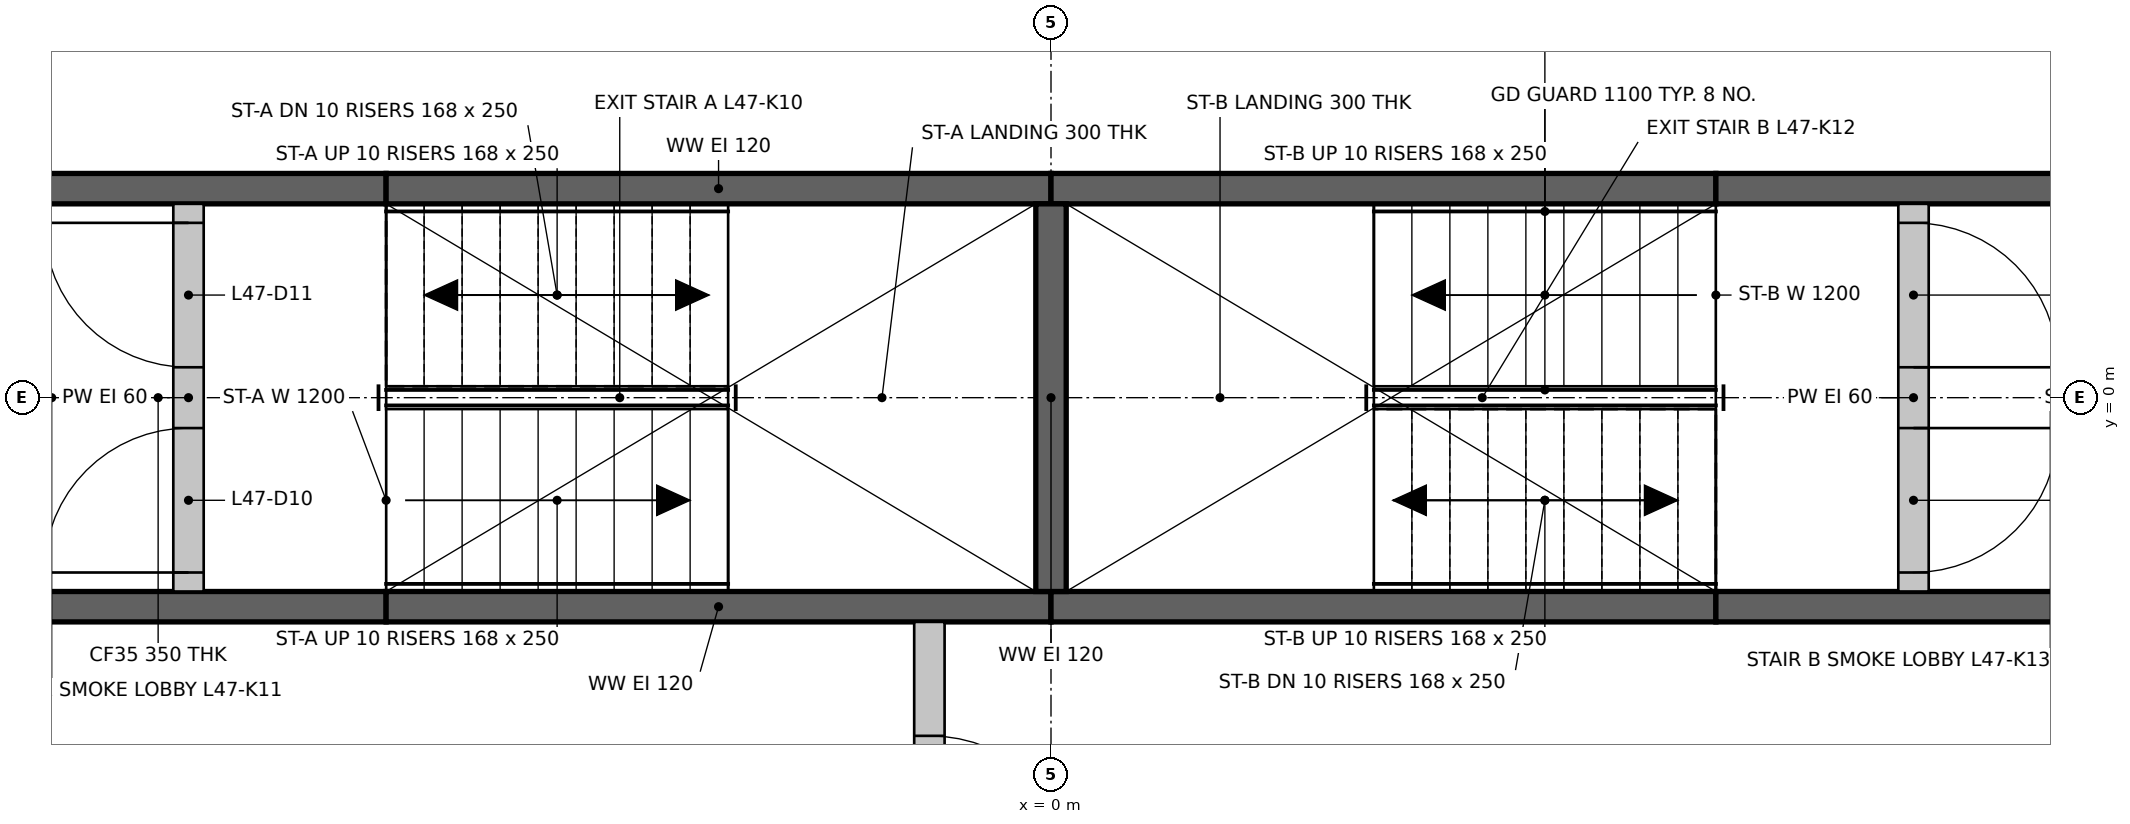
"""IFC4 building model, lengths in metres.
Left out: names, types, materials, properties, quantities, classifications, styles, units other than length and angle.
Written with IfcOpenShell. Run it as: python <this file> out.ifc"""

import sys

from ifc_helpers import new_model, si_unit, direction, frame, frame_2d, origin, place, context, subcontext, project, spatial, rectangle, extrude, element, fill, save


model = new_model("IFC4")
c1 = context("Model", 3, precision=1e-05, world=origin(), true_north=direction((0.0, 1.0)))
c2 = subcontext(c1, "Body", "Model", "MODEL_VIEW")
j1 = project(units=[si_unit("LENGTHUNIT", "METRE"), si_unit("PLANEANGLEUNIT", "RADIAN")], contexts=[c1])
p1 = place(None, origin())
s1 = spatial("IfcSite", under=j1, at=p1, CompositionType="ELEMENT")
p2 = place(p1, origin())
s2 = spatial("IfcBuilding", under=s1, at=p2, CompositionType="ELEMENT")
p3 = place(p2, frame((0.0, 0.0, 180.95)))
s3 = spatial("IfcBuildingStorey", under=s2, at=p3, CompositionType="ELEMENT", Elevation=180.95)
p4 = place(p3, frame((-7.374, -1.375, 0.0), z_axis=(0.0, 0.0, 1.0), x_axis=(1.0, 0.0, 0.0)))
e1 = element("IfcWall", 1, at=p4, inside=s3, PredefinedType="SHEAR", context=c2, shape_type="SweptSolid", body=[
    extrude(rectangle(XDim=3.0, YDim=0.2, at=frame_2d((1.5, 0.0))), origin(), (0.0, 0.0, 1.0), 3.0),
])
for number, where, z_axis, x_axis in (
    (2, (-4.374, -1.375, 0.0), (0.0, 0.0, 1.0), (1.0, 0.0, 0.0)),
    (3, (0.0, -1.375, 0.0), (0.0, 0.0, 1.0), (1.0, 0.0, 0.0)),
):
    element("IfcWall", number, at=place(p3, frame(where, z_axis=z_axis, x_axis=x_axis)), inside=s3, PredefinedType="SHEAR", context=c2, shape_type="SweptSolid", body=[
        extrude(rectangle(XDim=4.374, YDim=0.2, at=frame_2d((2.187, 0.0))), origin(), (0.0, 0.0, 1.0), 3.0),
    ])
for number, where, z_axis, x_axis in (
    (4, (4.374, -1.375, 0.0), (0.0, 0.0, 1.0), (1.0, 0.0, 0.0)),
    (5, (-7.374, 1.375, 0.0), (0.0, 0.0, 1.0), (1.0, 0.0, 0.0)),
):
    element("IfcWall", number, at=place(p3, frame(where, z_axis=z_axis, x_axis=x_axis)), inside=s3, PredefinedType="SHEAR", context=c2, shape_type="SweptSolid", body=[
        extrude(rectangle(XDim=3.0, YDim=0.2, at=frame_2d((1.5, 0.0))), origin(), (0.0, 0.0, 1.0), 3.0),
    ])
for number, where, z_axis, x_axis in (
    (6, (-4.374, 1.375, 0.0), (0.0, 0.0, 1.0), (1.0, 0.0, 0.0)),
    (7, (0.0, 1.375, 0.0), (0.0, 0.0, 1.0), (1.0, 0.0, 0.0)),
):
    element("IfcWall", number, at=place(p3, frame(where, z_axis=z_axis, x_axis=x_axis)), inside=s3, PredefinedType="SHEAR", context=c2, shape_type="SweptSolid", body=[
        extrude(rectangle(XDim=4.374, YDim=0.2, at=frame_2d((2.187, 0.0))), origin(), (0.0, 0.0, 1.0), 3.0),
    ])
p5 = place(p3, frame((4.374, 1.375, 0.0), z_axis=(0.0, 0.0, 1.0), x_axis=(1.0, 0.0, 0.0)))
e8 = element("IfcWall", 8, at=p5, inside=s3, PredefinedType="SHEAR", context=c2, shape_type="SweptSolid", body=[
    extrude(rectangle(XDim=3.0, YDim=0.2, at=frame_2d((1.5, 0.0))), origin(), (0.0, 0.0, 1.0), 3.0),
])
p6 = place(p3, frame((0.0, -1.275, 0.0), z_axis=(0.0, 0.0, 1.0), x_axis=(0.0, 1.0, 0.0)))
e9 = element("IfcWall", 9, at=p6, inside=s3, PredefinedType="SHEAR", context=c2, shape_type="SweptSolid", body=[
    extrude(rectangle(XDim=2.55, YDim=0.2, at=frame_2d((1.275, 0.0))), origin(), (0.0, 0.0, 1.0), 3.0),
])
p7 = place(p3, frame((-0.8, -3.974, 0.0), z_axis=(0.0, 0.0, 1.0), x_axis=(0.0, 1.0, 0.0)))
e10 = element("IfcWall", 10, at=p7, inside=s3, PredefinedType="PARTITIONING", context=c2, shape_type="SweptSolid", body=[
    extrude(rectangle(XDim=2.499, YDim=0.2, at=frame_2d((1.25, 0.0))), origin(), (0.0, 0.0, 1.0), 3.0),
])
p8 = place(p7, frame((0.75, 0.0, 0.0)))
e11 = element("IfcOpeningElement", 11, at=p8, cuts=e10, PredefinedType="OPENING", context=c2, shape_type="SweptSolid", body=[
    extrude(rectangle(XDim=1.0, YDim=2.1, at=frame_2d((0.5, 1.05))), frame((0.0, 0.11, 0.0), z_axis=(0.0, -1.0, 0.0), x_axis=(1.0, 0.0, 0.0)), (0.0, 0.0, 1.0), 0.22),
])
p9 = place(p3, frame((-5.674, -1.275, 0.0), z_axis=(0.0, 0.0, 1.0), x_axis=(0.0, 1.0, 0.0)))
e12 = element("IfcWall", 12, at=p9, inside=s3, PredefinedType="PARTITIONING", context=c2, shape_type="SweptSolid", body=[
    extrude(rectangle(XDim=2.55, YDim=0.2, at=frame_2d((1.275, 0.0))), origin(), (0.0, 0.0, 1.0), 3.0),
])
p10 = place(p9, frame((0.125, 0.0, 0.0)))
e13 = element("IfcOpeningElement", 13, at=p10, cuts=e12, PredefinedType="OPENING", context=c2, shape_type="SweptSolid", body=[
    extrude(rectangle(XDim=0.95, YDim=2.1, at=frame_2d((0.475, 1.05))), frame((0.0, 0.11, 0.0), z_axis=(0.0, -1.0, 0.0), x_axis=(1.0, 0.0, 0.0)), (0.0, 0.0, 1.0), 0.22),
])
p11 = place(p9, frame((1.475, 0.0, 0.0)))
e14 = element("IfcOpeningElement", 14, at=p11, cuts=e12, PredefinedType="OPENING", context=c2, shape_type="SweptSolid", body=[
    extrude(rectangle(XDim=0.95, YDim=2.1, at=frame_2d((0.475, 1.05))), frame((0.0, 0.11, 0.0), z_axis=(0.0, -1.0, 0.0), x_axis=(1.0, 0.0, 0.0)), (0.0, 0.0, 1.0), 0.22),
])
p12 = place(p3, frame((5.674, -1.275, 0.0), z_axis=(0.0, 0.0, 1.0), x_axis=(0.0, 1.0, 0.0)))
e15 = element("IfcWall", 15, at=p12, inside=s3, PredefinedType="PARTITIONING", context=c2, shape_type="SweptSolid", body=[
    extrude(rectangle(XDim=2.55, YDim=0.2, at=frame_2d((1.275, 0.0))), origin(), (0.0, 0.0, 1.0), 3.0),
])
p13 = place(p12, frame((0.125, 0.0, 0.0)))
e16 = element("IfcOpeningElement", 16, at=p13, cuts=e15, PredefinedType="OPENING", context=c2, shape_type="SweptSolid", body=[
    extrude(rectangle(XDim=0.95, YDim=2.1, at=frame_2d((0.475, 1.05))), frame((0.0, 0.11, 0.0), z_axis=(0.0, -1.0, 0.0), x_axis=(1.0, 0.0, 0.0)), (0.0, 0.0, 1.0), 0.22),
])
p14 = place(p12, frame((1.475, 0.0, 0.0)))
e17 = element("IfcOpeningElement", 17, at=p14, cuts=e15, PredefinedType="OPENING", context=c2, shape_type="SweptSolid", body=[
    extrude(rectangle(XDim=0.95, YDim=2.1, at=frame_2d((0.475, 1.05))), frame((0.0, 0.11, 0.0), z_axis=(0.0, -1.0, 0.0), x_axis=(1.0, 0.0, 0.0)), (0.0, 0.0, 1.0), 0.22),
])
p15 = place(p10, origin())
e18 = element("IfcDoor", 18, at=p15, inside=s3, OperationType="SINGLE_SWING_LEFT", PredefinedType="DOOR", context=c2, shape_type="SweptSolid", body=[
    extrude(rectangle(XDim=0.95, YDim=2.1, at=frame_2d((0.475, 1.05))), frame((0.0, 0.025, 0.0), z_axis=(0.0, -1.0, 0.0), x_axis=(1.0, 0.0, 0.0)), (0.0, 0.0, 1.0), 0.05),
])
fill(e13, e18)
p16 = place(p11, origin())
e19 = element("IfcDoor", 19, at=p16, inside=s3, OperationType="SINGLE_SWING_RIGHT", PredefinedType="DOOR", context=c2, shape_type="SweptSolid", body=[
    extrude(rectangle(XDim=0.95, YDim=2.1, at=frame_2d((0.475, 1.05))), frame((0.0, 0.025, 0.0), z_axis=(0.0, -1.0, 0.0), x_axis=(1.0, 0.0, 0.0)), (0.0, 0.0, 1.0), 0.05),
])
fill(e14, e19)
p17 = place(p13, frame((0.95, 0.0, 0.0), z_axis=(0.0, 0.0, 1.0), x_axis=(-1.0, 0.0, 0.0)))
e20 = element("IfcDoor", 20, at=p17, inside=s3, OperationType="SINGLE_SWING_RIGHT", PredefinedType="DOOR", context=c2, shape_type="SweptSolid", body=[
    extrude(rectangle(XDim=0.95, YDim=2.1, at=frame_2d((0.475, 1.05))), frame((0.0, 0.025, 0.0), z_axis=(0.0, -1.0, 0.0), x_axis=(1.0, 0.0, 0.0)), (0.0, 0.0, 1.0), 0.05),
])
fill(e16, e20)
p18 = place(p14, frame((0.95, 0.0, 0.0), z_axis=(0.0, 0.0, 1.0), x_axis=(-1.0, 0.0, 0.0)))
e21 = element("IfcDoor", 21, at=p18, inside=s3, OperationType="SINGLE_SWING_LEFT", PredefinedType="DOOR", context=c2, shape_type="SweptSolid", body=[
    extrude(rectangle(XDim=0.95, YDim=2.1, at=frame_2d((0.475, 1.05))), frame((0.0, 0.025, 0.0), z_axis=(0.0, -1.0, 0.0), x_axis=(1.0, 0.0, 0.0)), (0.0, 0.0, 1.0), 0.05),
])
fill(e17, e21)
p19 = place(p8, frame((1.0, 0.0, 0.0), z_axis=(0.0, 0.0, 1.0), x_axis=(-1.0, 0.0, 0.0)))
e22 = element("IfcDoor", 22, at=p19, inside=s3, OperationType="SINGLE_SWING_LEFT", PredefinedType="DOOR", context=c2, shape_type="SweptSolid", body=[
    extrude(rectangle(XDim=1.0, YDim=2.1, at=frame_2d((0.5, 1.05))), frame((0.0, 0.025, 0.0), z_axis=(0.0, -1.0, 0.0), x_axis=(1.0, 0.0, 0.0)), (0.0, 0.0, 1.0), 0.05),
])
fill(e11, e22)
save(model, sys.argv[1])
